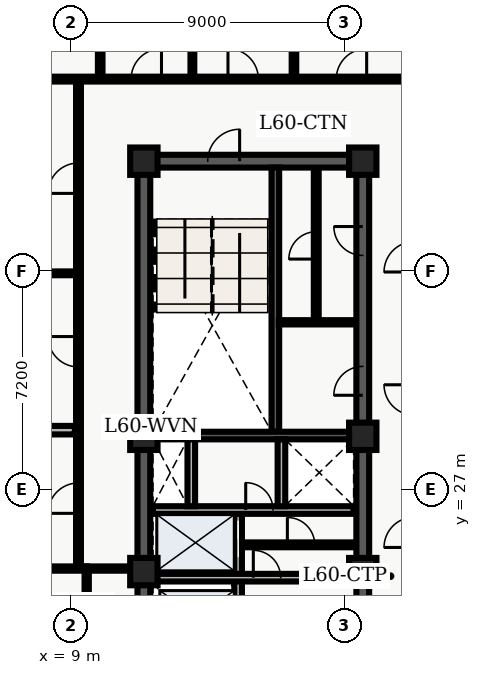
"""IFC4 building model, lengths in metres.
Left out: names, types, materials, properties, quantities, classifications, styles, units other than length and angle.
Written with IfcOpenShell. Run it as: python <this file> out.ifc"""

import sys

from ifc_helpers import new_model, entity, si_unit, converted_unit, direction, frame, origin_with_axes, origin_2d_with_axis, place, context, subcontext, project, spatial, polyline, rectangle, outline, extrude, element, fill, save


model = new_model("IFC4")
c1 = context("Model", 3, precision=1e-05, world=origin_with_axes(), true_north=direction((0.0, 1.0)))
c2 = subcontext(c1, "Body", "Model", "MODEL_VIEW")
j1 = project(units=[si_unit("LENGTHUNIT", "METRE"), converted_unit("PLANEANGLEUNIT", "DEGREE", entity("IfcPlaneAngleMeasure", 0.017), si_unit("PLANEANGLEUNIT", "RADIAN"), dimensions=[0, 0, 0, 0, 0, 0, 0])], contexts=[c1])
p1 = place(None, origin_with_axes())
s1 = spatial("IfcSite", under=j1, at=p1, CompositionType="ELEMENT")
p2 = place(p1, origin_with_axes())
s2 = spatial("IfcBuilding", under=s1, at=p2, CompositionType="ELEMENT")
p3 = place(p2, frame((0.0, 0.0, 244.2), z_axis=(0.0, 0.0, 1.0), x_axis=(1.0, 0.0, 0.0)))
s3 = spatial("IfcBuildingStorey", under=s2, at=p3, CompositionType="ELEMENT", Elevation=244.2)
p4 = place(p3, frame((11.4, 10.8, 0.0), z_axis=(0.0, 0.0, 1.0), x_axis=(0.0, 1.0, 0.0)))
e1 = element("IfcWall", 1, at=p4, inside=s3, PredefinedType="SHEAR", context=c2, shape_type="SweptSolid", body=[
    extrude(outline(polyline([(0.0, -0.21), (27.0, -0.21), (27.0, 0.21), (0.0, 0.21), (0.0, -0.21)])), origin_with_axes(), (0.0, 0.0, 1.0), 3.6),
])
p5 = place(p3, frame((11.4, 37.8, 0.0), z_axis=(0.0, 0.0, 1.0), x_axis=(1.0, 0.0, 0.0)))
e2 = element("IfcWall", 2, at=p5, inside=s3, PredefinedType="SHEAR", context=c2, shape_type="SweptSolid", body=[
    extrude(outline(polyline([(0.0, -0.21), (7.2, -0.21), (7.2, 0.21), (0.0, 0.21), (0.0, -0.21)])), origin_with_axes(), (0.0, 0.0, 1.0), 3.6),
])
p6 = place(p5, frame((2.625, 0.0, 0.0), z_axis=(0.0, 0.0, 1.0), x_axis=(1.0, 0.0, 0.0)))
e3 = element("IfcOpeningElement", 3, at=p6, cuts=e2, PredefinedType="OPENING", context=c2, shape_type="SweptSolid", body=[
    extrude(rectangle(XDim=1.05, YDim=0.44, at=origin_2d_with_axis()), origin_with_axes(), (0.0, 0.0, 1.0), 2.15),
])
p7 = place(p3, frame((18.6, 10.8, 0.0), z_axis=(0.0, 0.0, 1.0), x_axis=(0.0, 1.0, 0.0)))
e4 = element("IfcWall", 4, at=p7, inside=s3, PredefinedType="SHEAR", context=c2, shape_type="SweptSolid", body=[
    extrude(outline(polyline([(0.0, -0.21), (13.5, -0.21), (13.5, 0.21), (0.0, 0.21), (0.0, -0.21)])), origin_with_axes(), (0.0, 0.0, 1.0), 3.6),
])
p8 = place(p7, frame((1.3, 0.0, 0.0), z_axis=(0.0, 0.0, 1.0), x_axis=(1.0, 0.0, 0.0)))
e5 = element("IfcOpeningElement", 5, at=p8, cuts=e4, PredefinedType="OPENING", context=c2, shape_type="SweptSolid", body=[
    extrude(rectangle(XDim=1.1, YDim=0.44, at=origin_2d_with_axis()), origin_with_axes(), (0.0, 0.0, 1.0), 2.15),
])
p9 = place(p7, frame((3.4, 0.0, 0.0), z_axis=(0.0, 0.0, 1.0), x_axis=(1.0, 0.0, 0.0)))
e6 = element("IfcOpeningElement", 6, at=p9, cuts=e4, PredefinedType="OPENING", context=c2, shape_type="SweptSolid", body=[
    extrude(rectangle(XDim=1.1, YDim=0.44, at=origin_2d_with_axis()), origin_with_axes(), (0.0, 0.0, 1.0), 2.15),
])
p10 = place(p7, frame((11.125, 0.0, 0.0), z_axis=(0.0, 0.0, 1.0), x_axis=(1.0, 0.0, 0.0)))
e7 = element("IfcOpeningElement", 7, at=p10, cuts=e4, PredefinedType="OPENING", context=c2, shape_type="SweptSolid", body=[
    extrude(rectangle(XDim=1.05, YDim=0.44, at=origin_2d_with_axis()), origin_with_axes(), (0.0, 0.0, 1.0), 2.15),
])
p11 = place(p7, frame((6.675, 0.0, 0.0), z_axis=(0.0, 0.0, 1.0), x_axis=(1.0, 0.0, 0.0)))
e8 = element("IfcOpeningElement", 8, at=p11, cuts=e4, PredefinedType="OPENING", context=c2, shape_type="SweptSolid", body=[
    extrude(rectangle(XDim=0.95, YDim=0.44, at=origin_2d_with_axis()), origin_with_axes(), (0.0, 0.0, 1.0), 2.15),
])
p12 = place(p3, frame((18.6, 24.3, 0.0), z_axis=(0.0, 0.0, 1.0), x_axis=(0.0, 1.0, 0.0)))
e9 = element("IfcWall", 9, at=p12, inside=s3, PredefinedType="SHEAR", context=c2, shape_type="SweptSolid", body=[
    extrude(outline(polyline([(0.0, -0.21), (13.5, -0.21), (13.5, 0.21), (0.0, 0.21), (0.0, -0.21)])), origin_with_axes(), (0.0, 0.0, 1.0), 3.6),
])
p13 = place(p12, frame((6.275, 0.0, 0.0), z_axis=(0.0, 0.0, 1.0), x_axis=(1.0, 0.0, 0.0)))
e10 = element("IfcOpeningElement", 10, at=p13, cuts=e9, PredefinedType="OPENING", context=c2, shape_type="SweptSolid", body=[
    extrude(rectangle(XDim=0.95, YDim=0.44, at=origin_2d_with_axis()), origin_with_axes(), (0.0, 0.0, 1.0), 2.15),
])
p14 = place(p12, frame((10.875, 0.0, 0.0), z_axis=(0.0, 0.0, 1.0), x_axis=(1.0, 0.0, 0.0)))
e11 = element("IfcOpeningElement", 11, at=p14, cuts=e9, PredefinedType="OPENING", context=c2, shape_type="SweptSolid", body=[
    extrude(rectangle(XDim=0.95, YDim=0.44, at=origin_2d_with_axis()), origin_with_axes(), (0.0, 0.0, 1.0), 2.15),
])
p15 = place(p3, frame((15.725, 28.9, 0.0), z_axis=(0.0, 0.0, 1.0), x_axis=(0.0, 1.0, 0.0)))
e12 = element("IfcWall", 12, at=p15, inside=s3, PredefinedType="SHEAR", context=c2, shape_type="SweptSolid", body=[
    extrude(outline(polyline([(0.0, -0.125), (8.69, -0.125), (8.69, 0.125), (0.0, 0.125), (0.0, -0.125)])), origin_with_axes(), (0.0, 0.0, 1.0), 3.6),
])
p16 = place(p3, frame((11.61, 28.775, 0.0), z_axis=(0.0, 0.0, 1.0), x_axis=(1.0, 0.0, 0.0)))
e13 = element("IfcWall", 13, at=p16, inside=s3, PredefinedType="SHEAR", context=c2, shape_type="SweptSolid", body=[
    extrude(outline(polyline([(0.0, -0.125), (6.78, -0.125), (6.78, 0.125), (0.0, 0.125), (0.0, -0.125)])), origin_with_axes(), (0.0, 0.0, 1.0), 3.6),
])
p17 = place(p3, frame((14.5, 19.95, 0.0), z_axis=(0.0, 0.0, 1.0), x_axis=(0.0, 1.0, 0.0)))
e14 = element("IfcWall", 14, at=p17, inside=s3, PredefinedType="SOLIDWALL", context=c2, shape_type="SweptSolid", body=[
    extrude(outline(polyline([(0.0, -0.125), (6.25, -0.125), (6.25, 0.125), (0.0, 0.125), (0.0, -0.125)])), origin_with_axes(), (0.0, 0.0, 1.0), 2.64),
])
p18 = place(p17, frame((1.025, 0.0, 0.0), z_axis=(0.0, 0.0, 1.0), x_axis=(1.0, 0.0, 0.0)))
e15 = element("IfcOpeningElement", 15, at=p18, cuts=e14, PredefinedType="OPENING", context=c2, shape_type="SweptSolid", body=[
    extrude(rectangle(XDim=1.1, YDim=0.27, at=origin_2d_with_axis()), origin_with_axes(), (0.0, 0.0, 1.0), 2.15),
])
p19 = place(p17, frame((2.975, 0.0, 0.0), z_axis=(0.0, 0.0, 1.0), x_axis=(1.0, 0.0, 0.0)))
e16 = element("IfcOpeningElement", 16, at=p19, cuts=e14, PredefinedType="OPENING", context=c2, shape_type="SweptSolid", body=[
    extrude(rectangle(XDim=1.1, YDim=0.27, at=origin_2d_with_axis()), origin_with_axes(), (0.0, 0.0, 1.0), 2.15),
])
p20 = place(p17, frame((5.425, 0.0, 0.0), z_axis=(0.0, 0.0, 1.0), x_axis=(1.0, 0.0, 0.0)))
e17 = element("IfcOpeningElement", 17, at=p20, cuts=e14, PredefinedType="OPENING", context=c2, shape_type="SweptSolid", body=[
    extrude(rectangle(XDim=1.2, YDim=0.27, at=origin_2d_with_axis()), origin_with_axes(), (0.0, 0.0, 1.0), 2.15),
])
p21 = place(p3, frame((11.7, 24.1, 0.0), z_axis=(0.0, 0.0, 1.0), x_axis=(1.0, 0.0, 0.0)))
e18 = element("IfcWall", 18, at=p21, inside=s3, PredefinedType="SOLIDWALL", context=c2, shape_type="SweptSolid", body=[
    extrude(outline(polyline([(0.0, -0.125), (6.6, -0.125), (6.6, 0.125), (0.0, 0.125), (0.0, -0.125)])), origin_with_axes(), (0.0, 0.0, 1.0), 2.64),
])
p22 = place(p21, frame((3.75, 0.0, 0.0), z_axis=(0.0, 0.0, 1.0), x_axis=(1.0, 0.0, 0.0)))
e19 = element("IfcOpeningElement", 19, at=p22, cuts=e18, PredefinedType="OPENING", context=c2, shape_type="SweptSolid", body=[
    extrude(rectangle(XDim=0.9, YDim=0.27, at=origin_2d_with_axis()), origin_with_axes(), (0.0, 0.0, 1.0), 2.15),
])
p23 = place(p3, frame((11.7, 26.325, 0.0), z_axis=(0.0, 0.0, 1.0), x_axis=(1.0, 0.0, 0.0)))
e20 = element("IfcWall", 20, at=p23, inside=s3, PredefinedType="SOLIDWALL", context=c2, shape_type="SweptSolid", body=[
    extrude(outline(polyline([(0.0, -0.125), (6.6, -0.125), (6.6, 0.125), (0.0, 0.125), (0.0, -0.125)])), origin_with_axes(), (0.0, 0.0, 1.0), 2.64),
])
p24 = place(p23, frame((3.5, 0.0, 0.0), z_axis=(0.0, 0.0, 1.0), x_axis=(1.0, 0.0, 0.0)))
e21 = element("IfcOpeningElement", 21, at=p24, cuts=e20, PredefinedType="OPENING", context=c2, shape_type="SweptSolid", body=[
    extrude(rectangle(XDim=0.9, YDim=0.27, at=origin_2d_with_axis()), origin_with_axes(), (0.0, 0.0, 1.0), 2.15),
])
for number, where, z_axis, x_axis in (
    (22, (12.96, 26.45, 0.0), (0.0, 0.0, 1.0), (0.0, 1.0, 0.0)),
    (23, (15.925, 26.45, 0.0), (0.0, 0.0, 1.0), (0.0, 1.0, 0.0)),
):
    element("IfcWall", number, at=place(p3, frame(where, z_axis=z_axis, x_axis=x_axis)), inside=s3, PredefinedType="SOLIDWALL", context=c2, shape_type="SweptSolid", body=[
        extrude(outline(polyline([(0.0, -0.125), (2.2, -0.125), (2.2, 0.125), (0.0, 0.125), (0.0, -0.125)])), origin_with_axes(), (0.0, 0.0, 1.0), 2.64),
    ])
for number, where, z_axis, x_axis in (
    (24, (11.4, 24.3, 0.0), (0.0, 0.0, 1.0), (1.0, 0.0, 0.0)),
    (25, (11.4, 28.75, 0.0), (0.0, 0.0, 1.0), (1.0, 0.0, 0.0)),
    (26, (11.4, 37.8, 0.0), (0.0, 0.0, 1.0), (1.0, 0.0, 0.0)),
    (27, (18.6, 24.3, 0.0), (0.0, 0.0, 1.0), (1.0, 0.0, 0.0)),
    (28, (18.6, 28.75, 0.0), (0.0, 0.0, 1.0), (1.0, 0.0, 0.0)),
    (29, (18.6, 37.8, 0.0), (0.0, 0.0, 1.0), (1.0, 0.0, 0.0)),
):
    element("IfcColumn", number, at=place(p3, frame(where, z_axis=z_axis, x_axis=x_axis)), inside=s3, PredefinedType="COLUMN", context=c2, shape_type="SweptSolid", body=[
        extrude(rectangle(XDim=0.9, YDim=0.9, at=origin_2d_with_axis()), origin_with_axes(), (0.0, 0.0, 1.0), 3.9),
    ])
p25 = place(p3, frame((14.62, 25.18, 0.0), z_axis=(0.0, 0.0, 1.0), x_axis=(1.0, 0.0, 0.0)))
e30 = element("IfcWall", 30, at=p25, inside=s3, PredefinedType="PARTITIONING", context=c2, shape_type="SweptSolid", body=[
    extrude(outline(polyline([(0.0, -0.08), (3.68, -0.08), (3.68, 0.08), (0.0, 0.08), (0.0, -0.08)])), origin_with_axes(), (0.0, 0.0, 1.0), 2.64),
])
p26 = place(p25, frame((1.95, 0.0, 0.0), z_axis=(0.0, 0.0, 1.0), x_axis=(1.0, 0.0, 0.0)))
e31 = element("IfcOpeningElement", 31, at=p26, cuts=e30, PredefinedType="OPENING", context=c2, shape_type="SweptSolid", body=[
    extrude(rectangle(XDim=0.9, YDim=0.18, at=origin_2d_with_axis()), origin_with_axes(), (0.0, 0.0, 1.0), 2.15),
])
p27 = place(p3, frame((15.84, 32.5, 0.0), z_axis=(0.0, 0.0, 1.0), x_axis=(1.0, 0.0, 0.0)))
e32 = element("IfcWall", 32, at=p27, inside=s3, PredefinedType="PARTITIONING", context=c2, shape_type="SweptSolid", body=[
    extrude(outline(polyline([(0.0, -0.07), (2.46, -0.07), (2.46, 0.07), (0.0, 0.07), (0.0, -0.07)])), origin_with_axes(), (0.0, 0.0, 1.0), 2.64),
])
p28 = place(p3, frame((17.07, 32.58, 0.0), z_axis=(0.0, 0.0, 1.0), x_axis=(0.0, 1.0, 0.0)))
e33 = element("IfcWall", 33, at=p28, inside=s3, PredefinedType="PARTITIONING", context=c2, shape_type="SweptSolid", body=[
    extrude(outline(polyline([(0.0, -0.08), (4.92, -0.08), (4.92, 0.08), (0.0, 0.08), (0.0, -0.08)])), origin_with_axes(), (0.0, 0.0, 1.0), 2.64),
])
p29 = place(p28, frame((2.45, 0.0, 0.0), z_axis=(0.0, 0.0, 1.0), x_axis=(1.0, 0.0, 0.0)))
e34 = element("IfcOpeningElement", 34, at=p29, cuts=e33, PredefinedType="OPENING", context=c2, shape_type="SweptSolid", body=[
    extrude(rectangle(XDim=0.9, YDim=0.18, at=origin_2d_with_axis()), origin_with_axes(), (0.0, 0.0, 1.0), 2.15),
])
p30 = place(p3, frame((9.52, 20.4, 0.0), z_axis=(0.0, 0.0, 1.0), x_axis=(0.0, 1.0, 0.0)))
e35 = element("IfcWall", 35, at=p30, inside=s3, PredefinedType="PARTITIONING", context=c2, shape_type="SweptSolid", body=[
    extrude(outline(polyline([(0.0, -0.07), (4.0, -0.07), (4.0, 0.07), (0.0, 0.07), (0.0, -0.07)])), origin_with_axes(), (0.0, 0.0, 1.0), 2.64),
])
p31 = place(p3, frame((9.52, 24.4, 0.0), z_axis=(0.0, 0.0, 1.0), x_axis=(1.0, 0.0, 0.0)))
e36 = element("IfcWall", 36, at=p31, inside=s3, PredefinedType="PARTITIONING", context=c2, shape_type="SweptSolid", body=[
    extrude(outline(polyline([(0.0, -0.07), (1.58, -0.07), (1.58, 0.07), (0.0, 0.07), (0.0, -0.07)])), origin_with_axes(), (0.0, 0.0, 1.0), 2.64),
])
p32 = place(p3, frame((7.1, 40.5, 0.0), z_axis=(0.0, 0.0, 1.0), x_axis=(1.0, 0.0, 0.0)))
e37 = element("IfcWall", 37, at=p32, inside=s3, PredefinedType="PARTITIONING", context=c2, shape_type="SweptSolid", body=[
    extrude(outline(polyline([(0.0, -0.08), (24.965, -0.08), (24.965, 0.08), (0.0, 0.08), (0.0, -0.08)])), origin_with_axes(), (0.0, 0.0, 1.0), 2.64),
])
p33 = place(p32, frame((4.38, 0.0, 0.0), z_axis=(0.0, 0.0, 1.0), x_axis=(1.0, 0.0, 0.0)))
e38 = element("IfcOpeningElement", 38, at=p33, cuts=e37, PredefinedType="OPENING", context=c2, shape_type="SweptSolid", body=[
    extrude(rectangle(XDim=1.0, YDim=0.18, at=origin_2d_with_axis()), origin_with_axes(), (0.0, 0.0, 1.0), 2.15),
])
p34 = place(p32, frame((7.566, 0.0, 0.0), z_axis=(0.0, 0.0, 1.0), x_axis=(1.0, 0.0, 0.0)))
e39 = element("IfcOpeningElement", 39, at=p34, cuts=e37, PredefinedType="OPENING", context=c2, shape_type="SweptSolid", body=[
    extrude(rectangle(XDim=1.0, YDim=0.18, at=origin_2d_with_axis()), origin_with_axes(), (0.0, 0.0, 1.0), 2.15),
])
p35 = place(p32, frame((11.129, 0.0, 0.0), z_axis=(0.0, 0.0, 1.0), x_axis=(1.0, 0.0, 0.0)))
e40 = element("IfcOpeningElement", 40, at=p35, cuts=e37, PredefinedType="OPENING", context=c2, shape_type="SweptSolid", body=[
    extrude(rectangle(XDim=1.0, YDim=0.18, at=origin_2d_with_axis()), origin_with_axes(), (0.0, 0.0, 1.0), 2.15),
])
p36 = place(p3, frame((9.25, 24.4, 0.0), z_axis=(0.0, 0.0, 1.0), x_axis=(0.0, 1.0, 0.0)))
e41 = element("IfcWall", 41, at=p36, inside=s3, PredefinedType="PARTITIONING", context=c2, shape_type="SweptSolid", body=[
    extrude(outline(polyline([(0.0, -0.08), (16.1, -0.08), (16.1, 0.08), (0.0, 0.08), (0.0, -0.08)])), origin_with_axes(), (0.0, 0.0, 1.0), 2.64),
])
p37 = place(p36, frame((2.316, 0.0, 0.0), z_axis=(0.0, 0.0, 1.0), x_axis=(1.0, 0.0, 0.0)))
e42 = element("IfcOpeningElement", 42, at=p37, cuts=e41, PredefinedType="OPENING", context=c2, shape_type="SweptSolid", body=[
    extrude(rectangle(XDim=1.0, YDim=0.18, at=origin_2d_with_axis()), origin_with_axes(), (0.0, 0.0, 1.0), 2.15),
])
p38 = place(p36, frame((7.131, 0.0, 0.0), z_axis=(0.0, 0.0, 1.0), x_axis=(1.0, 0.0, 0.0)))
e43 = element("IfcOpeningElement", 43, at=p38, cuts=e41, PredefinedType="OPENING", context=c2, shape_type="SweptSolid", body=[
    extrude(rectangle(XDim=1.0, YDim=0.18, at=origin_2d_with_axis()), origin_with_axes(), (0.0, 0.0, 1.0), 2.15),
])
p39 = place(p36, frame((12.841, 0.0, 0.0), z_axis=(0.0, 0.0, 1.0), x_axis=(1.0, 0.0, 0.0)))
e44 = element("IfcOpeningElement", 44, at=p39, cuts=e41, PredefinedType="OPENING", context=c2, shape_type="SweptSolid", body=[
    extrude(rectangle(XDim=1.0, YDim=0.18, at=origin_2d_with_axis()), origin_with_axes(), (0.0, 0.0, 1.0), 2.15),
])
p40 = place(p3, frame((4.835, 24.4, 0.0), z_axis=(0.0, 0.0, 1.0), x_axis=(1.0, 0.0, 0.0)))
e45 = element("IfcWall", 45, at=p40, inside=s3, PredefinedType="PARTITIONING", context=c2, shape_type="SweptSolid", body=[
    extrude(outline(polyline([(0.0, -0.07), (4.685, -0.07), (4.685, 0.07), (0.0, 0.07), (0.0, -0.07)])), origin_with_axes(), (0.0, 0.0, 1.0), 2.64),
])
p41 = place(p3, frame((4.835, 28.952, 0.0), z_axis=(0.0, 0.0, 1.0), x_axis=(1.0, 0.0, 0.0)))
e46 = element("IfcWall", 46, at=p41, inside=s3, PredefinedType="PARTITIONING", context=c2, shape_type="SweptSolid", body=[
    extrude(outline(polyline([(0.0, -0.14), (4.295, -0.14), (4.295, 0.14), (0.0, 0.14), (0.0, -0.14)])), origin_with_axes(), (0.0, 0.0, 1.0), 2.64),
])
p42 = place(p3, frame((4.835, 34.111, 0.0), z_axis=(0.0, 0.0, 1.0), x_axis=(1.0, 0.0, 0.0)))
e47 = element("IfcWall", 47, at=p42, inside=s3, PredefinedType="PARTITIONING", context=c2, shape_type="SweptSolid", body=[
    extrude(outline(polyline([(0.0, -0.062), (4.295, -0.062), (4.295, 0.062), (0.0, 0.062), (0.0, -0.062)])), origin_with_axes(), (0.0, 0.0, 1.0), 2.64),
])
p43 = place(p3, frame((9.964, 40.6, 0.0), z_axis=(0.0, 0.0, 1.0), x_axis=(0.0, 1.0, 0.0)))
e48 = element("IfcWall", 48, at=p43, inside=s3, PredefinedType="PARTITIONING", context=c2, shape_type="SweptSolid", body=[
    extrude(outline(polyline([(0.0, -0.075), (7.665, -0.075), (7.665, 0.075), (0.0, 0.075), (0.0, -0.075)])), origin_with_axes(), (0.0, 0.0, 1.0), 2.64),
])
p44 = place(p43, frame((5.47, 0.0, 0.0), z_axis=(0.0, 0.0, 1.0), x_axis=(1.0, 0.0, 0.0)))
e49 = element("IfcOpeningElement", 49, at=p44, cuts=e48, PredefinedType="OPENING", context=c2, shape_type="SweptSolid", body=[
    extrude(rectangle(XDim=0.95, YDim=0.17, at=origin_2d_with_axis()), origin_with_axes(), (0.0, 0.0, 1.0), 2.15),
])
p45 = place(p3, frame((12.996, 40.6, 0.0), z_axis=(0.0, 0.0, 1.0), x_axis=(0.0, 1.0, 0.0)))
e50 = element("IfcWall", 50, at=p45, inside=s3, PredefinedType="PARTITIONING", context=c2, shape_type="SweptSolid", body=[
    extrude(outline(polyline([(0.0, -0.062), (7.665, -0.062), (7.665, 0.062), (0.0, 0.062), (0.0, -0.062)])), origin_with_axes(), (0.0, 0.0, 1.0), 2.64),
])
p46 = place(p3, frame((16.337, 40.6, 0.0), z_axis=(0.0, 0.0, 1.0), x_axis=(0.0, 1.0, 0.0)))
e51 = element("IfcWall", 51, at=p46, inside=s3, PredefinedType="PARTITIONING", context=c2, shape_type="SweptSolid", body=[
    extrude(outline(polyline([(0.0, -0.075), (7.665, -0.075), (7.665, 0.075), (0.0, 0.075), (0.0, -0.075)])), origin_with_axes(), (0.0, 0.0, 1.0), 2.64),
])
p47 = place(p17, frame((5.425, 0.0, 0.0), z_axis=(0.0, 0.0, 1.0), x_axis=(1.0, 0.0, 0.0)))
e52 = element("IfcDoor", 52, at=p47, inside=s3, OperationType="DOUBLE_DOOR_SLIDING", PredefinedType="DOOR", context=c2, shape_type="SweptSolid", body=[
    extrude(rectangle(XDim=1.2, YDim=0.09, at=origin_2d_with_axis()), origin_with_axes(), (0.0, 0.0, 1.0), 2.15),
])
fill(e17, e52)
p48 = place(p5, frame((2.625, 0.0, 0.0), z_axis=(0.0, 0.0, 1.0), x_axis=(1.0, 0.0, 0.0)))
e53 = element("IfcDoor", 53, at=p48, inside=s3, OperationType="SINGLE_SWING_RIGHT", PredefinedType="DOOR", context=c2, shape_type="SweptSolid", body=[
    extrude(rectangle(XDim=1.05, YDim=0.09, at=origin_2d_with_axis()), origin_with_axes(), (0.0, 0.0, 1.0), 2.15),
])
fill(e3, e53)
p49 = place(p23, frame((3.5, 0.0, 0.0), z_axis=(0.0, 0.0, 1.0), x_axis=(1.0, 0.0, 0.0)))
e54 = element("IfcDoor", 54, at=p49, inside=s3, OperationType="SINGLE_SWING_LEFT", PredefinedType="DOOR", context=c2, shape_type="SweptSolid", body=[
    extrude(rectangle(XDim=0.9, YDim=0.09, at=origin_2d_with_axis()), origin_with_axes(), (0.0, 0.0, 1.0), 2.15),
])
fill(e21, e54)
p50 = place(p21, frame((3.75, 0.0, 0.0), z_axis=(0.0, 0.0, 1.0), x_axis=(1.0, 0.0, 0.0)))
e55 = element("IfcDoor", 55, at=p50, inside=s3, OperationType="SINGLE_SWING_LEFT", PredefinedType="DOOR", context=c2, shape_type="SweptSolid", body=[
    extrude(rectangle(XDim=0.9, YDim=0.09, at=origin_2d_with_axis()), origin_with_axes(), (0.0, 0.0, 1.0), 2.15),
])
fill(e19, e55)
p51 = place(p25, frame((1.95, 0.0, 0.0), z_axis=(0.0, 0.0, 1.0), x_axis=(1.0, 0.0, 0.0)))
e56 = element("IfcDoor", 56, at=p51, inside=s3, OperationType="SINGLE_SWING_LEFT", PredefinedType="DOOR", context=c2, shape_type="SweptSolid", body=[
    extrude(rectangle(XDim=0.9, YDim=0.09, at=origin_2d_with_axis()), origin_with_axes(), (0.0, 0.0, 1.0), 2.15),
])
fill(e31, e56)
p52 = place(p12, frame((6.275, 0.0, 0.0), z_axis=(0.0, 0.0, 1.0), x_axis=(1.0, 0.0, 0.0)))
e57 = element("IfcDoor", 57, at=p52, inside=s3, OperationType="SINGLE_SWING_LEFT", PredefinedType="DOOR", context=c2, shape_type="SweptSolid", body=[
    extrude(rectangle(XDim=0.95, YDim=0.09, at=origin_2d_with_axis()), origin_with_axes(), (0.0, 0.0, 1.0), 2.15),
])
fill(e10, e57)
p53 = place(p28, frame((2.45, 0.0, 0.0), z_axis=(0.0, 0.0, 1.0), x_axis=(1.0, 0.0, 0.0)))
e58 = element("IfcDoor", 58, at=p53, inside=s3, OperationType="SINGLE_SWING_LEFT", PredefinedType="DOOR", context=c2, shape_type="SweptSolid", body=[
    extrude(rectangle(XDim=0.9, YDim=0.09, at=origin_2d_with_axis()), origin_with_axes(), (0.0, 0.0, 1.0), 2.15),
])
fill(e34, e58)
p54 = place(p12, frame((10.875, 0.0, 0.0), z_axis=(0.0, 0.0, 1.0), x_axis=(1.0, 0.0, 0.0)))
e59 = element("IfcDoor", 59, at=p54, inside=s3, OperationType="SINGLE_SWING_RIGHT", PredefinedType="DOOR", context=c2, shape_type="SweptSolid", body=[
    extrude(rectangle(XDim=0.95, YDim=0.09, at=origin_2d_with_axis()), origin_with_axes(), (0.0, 0.0, 1.0), 2.15),
])
fill(e11, e59)
p55 = place(p36, frame((2.316, 0.0, 0.0), z_axis=(0.0, 0.0, 1.0), x_axis=(1.0, 0.0, 0.0)))
e60 = element("IfcDoor", 60, at=p55, inside=s3, OperationType="SINGLE_SWING_LEFT", PredefinedType="DOOR", context=c2, shape_type="SweptSolid", body=[
    extrude(rectangle(XDim=1.0, YDim=0.09, at=origin_2d_with_axis()), origin_with_axes(), (0.0, 0.0, 1.0), 2.15),
])
fill(e42, e60)
p56 = place(p36, frame((7.131, 0.0, 0.0), z_axis=(0.0, 0.0, 1.0), x_axis=(1.0, 0.0, 0.0)))
e61 = element("IfcDoor", 61, at=p56, inside=s3, OperationType="SINGLE_SWING_RIGHT", PredefinedType="DOOR", context=c2, shape_type="SweptSolid", body=[
    extrude(rectangle(XDim=1.0, YDim=0.09, at=origin_2d_with_axis()), origin_with_axes(), (0.0, 0.0, 1.0), 2.15),
])
fill(e43, e61)
p57 = place(p36, frame((12.841, 0.0, 0.0), z_axis=(0.0, 0.0, 1.0), x_axis=(1.0, 0.0, 0.0)))
e62 = element("IfcDoor", 62, at=p57, inside=s3, OperationType="SINGLE_SWING_LEFT", PredefinedType="DOOR", context=c2, shape_type="SweptSolid", body=[
    extrude(rectangle(XDim=1.0, YDim=0.09, at=origin_2d_with_axis()), origin_with_axes(), (0.0, 0.0, 1.0), 2.15),
])
fill(e44, e62)
p58 = place(p32, frame((4.38, 0.0, 0.0), z_axis=(0.0, 0.0, 1.0), x_axis=(1.0, 0.0, 0.0)))
e63 = element("IfcDoor", 63, at=p58, inside=s3, OperationType="SINGLE_SWING_RIGHT", PredefinedType="DOOR", context=c2, shape_type="SweptSolid", body=[
    extrude(rectangle(XDim=1.0, YDim=0.09, at=origin_2d_with_axis()), origin_with_axes(), (0.0, 0.0, 1.0), 2.15),
])
fill(e38, e63)
p59 = place(p32, frame((7.566, 0.0, 0.0), z_axis=(0.0, 0.0, 1.0), x_axis=(1.0, 0.0, 0.0)))
e64 = element("IfcDoor", 64, at=p59, inside=s3, OperationType="SINGLE_SWING_LEFT", PredefinedType="DOOR", context=c2, shape_type="SweptSolid", body=[
    extrude(rectangle(XDim=1.0, YDim=0.09, at=origin_2d_with_axis()), origin_with_axes(), (0.0, 0.0, 1.0), 2.15),
])
fill(e39, e64)
p60 = place(p32, frame((11.129, 0.0, 0.0), z_axis=(0.0, 0.0, 1.0), x_axis=(1.0, 0.0, 0.0)))
e65 = element("IfcDoor", 65, at=p60, inside=s3, OperationType="SINGLE_SWING_RIGHT", PredefinedType="DOOR", context=c2, shape_type="SweptSolid", body=[
    extrude(rectangle(XDim=1.0, YDim=0.09, at=origin_2d_with_axis()), origin_with_axes(), (0.0, 0.0, 1.0), 2.15),
])
fill(e40, e65)
save(model, sys.argv[1])
